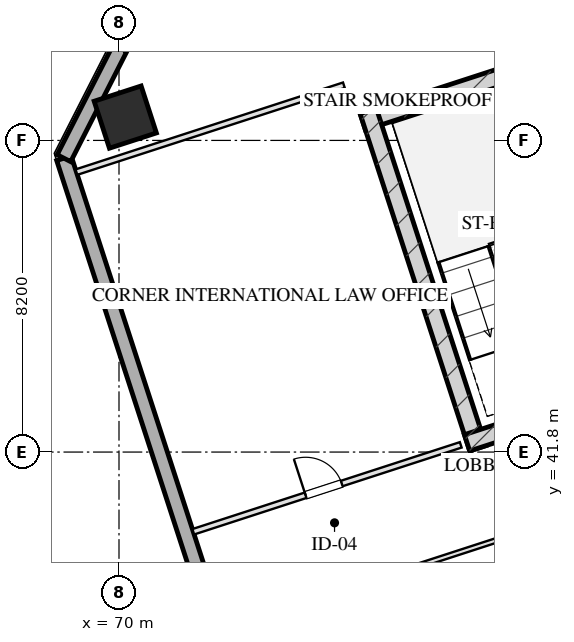
"""IFC4 building model, lengths in metres.
Left out: names, types, materials, properties, quantities, classifications, styles, units other than length and angle.
Written with IfcOpenShell. Run it as: python <this file> out.ifc"""

import sys

from ifc_helpers import new_model, si_unit, direction, frame, frame_2d, origin, origin_2d, place, context, subcontext, project, spatial, rectangle, hollow_rectangle, extrude, element, fill, save


model = new_model("IFC4")
c1 = context("Model", 3, precision=1e-05, world=origin(), true_north=direction((0.0, 1.0)))
c2 = subcontext(c1, "Body", "Model", "MODEL_VIEW")
j1 = project(units=[si_unit("LENGTHUNIT", "METRE"), si_unit("PLANEANGLEUNIT", "RADIAN")], contexts=[c1])
p1 = place(None, origin())
s1 = spatial("IfcSite", under=j1, at=p1, CompositionType="ELEMENT")
p2 = place(p1, origin())
s2 = spatial("IfcBuilding", under=s1, at=p2, CompositionType="ELEMENT")
p3 = place(p2, frame((0.0, 0.0, 192.05)))
s3 = spatial("IfcBuildingStorey", under=s2, at=p3, CompositionType="ELEMENT", Elevation=192.05)
p4 = place(p3, frame((76.415, 50.489, 0.0), z_axis=(0.0, 0.0, 1.0), x_axis=(0.951056810414, 0.309016089169, 0.0)))
e1 = element("IfcWall", 1, at=p4, inside=s3, PredefinedType="SHEAR", context=c2, shape_type="SweptSolid", body=[
    extrude(rectangle(XDim=16.25, YDim=0.45, at=frame_2d((8.125, 0.0))), origin(), (0.0, 0.0, 1.0), 3.45),
])
p5 = place(p3, frame((79.442, 41.899, 0.0), z_axis=(0.0, 0.0, 1.0), x_axis=(-0.309035778627, 0.951050412717, 0.0)))
e2 = element("IfcWall", 2, at=p5, inside=s3, PredefinedType="SHEAR", context=c2, shape_type="SweptSolid", body=[
    extrude(rectangle(XDim=9.33, YDim=0.45, at=frame_2d((4.665, 0.0))), origin(), (0.0, 0.0, 1.0), 3.45),
])
p6 = place(p3, frame((79.159, 42.043, 0.0), z_axis=(0.0, 0.0, 1.0), x_axis=(0.951047485828, 0.309044785913, 0.0)))
e3 = element("IfcWall", 3, at=p6, inside=s3, PredefinedType="SHEAR", context=c2, shape_type="SweptSolid", body=[
    extrude(rectangle(XDim=4.145, YDim=0.45, at=frame_2d((2.073, 0.0))), origin(), (0.0, 0.0, 1.0), 3.45),
])
p7 = place(p3, frame((70.165, 50.614, 0.0), z_axis=(0.0, 0.0, 1.0), x_axis=(0.951056516295, 0.309016994375, 0.0)))
e4 = element("IfcColumn", 4, at=p7, inside=s3, PredefinedType="COLUMN", context=c2, shape_type="SweptSolid", body=[
    extrude(hollow_rectangle(XDim=1.3, YDim=1.3, WallThickness=0.045, at=origin_2d()), origin(), (0.0, 0.0, 1.0), 3.451),
])
p8 = place(p3, frame((81.776, 8.827, 0.0), z_axis=(0.0, 0.0, 1.0), x_axis=(-0.309014228706, 0.951057414911, 0.0)))
e5 = element("IfcWall", 5, at=p8, inside=s3, PredefinedType="SOLIDWALL", context=c2, shape_type="SweptSolid", body=[
    extrude(rectangle(XDim=42.8, YDim=0.4, at=frame_2d((21.4, 0.0))), origin(), (0.0, 0.0, 1.0), 2.61),
])
p9 = place(p8, frame((13.95, 0.0, 0.75)))
e6 = element("IfcOpeningElement", 6, at=p9, cuts=e5, PredefinedType="OPENING", context=c2, shape_type="SweptSolid", body=[
    extrude(rectangle(XDim=2.1, YDim=1.46, at=frame_2d((1.05, 0.73))), frame((0.0, 0.21, 0.0), z_axis=(0.0, -1.0, 0.0), x_axis=(1.0, 0.0, 0.0)), (0.0, 0.0, 1.0), 0.42),
])
p10 = place(p8, frame((17.75, 0.0, 0.75)))
e7 = element("IfcOpeningElement", 7, at=p10, cuts=e5, PredefinedType="OPENING", context=c2, shape_type="SweptSolid", body=[
    extrude(rectangle(XDim=2.1, YDim=1.46, at=frame_2d((1.05, 0.73))), frame((0.0, 0.21, 0.0), z_axis=(0.0, -1.0, 0.0), x_axis=(1.0, 0.0, 0.0)), (0.0, 0.0, 1.0), 0.42),
])
p11 = place(p8, frame((22.95, 0.0, 0.75)))
e8 = element("IfcOpeningElement", 8, at=p11, cuts=e5, PredefinedType="OPENING", context=c2, shape_type="SweptSolid", body=[
    extrude(rectangle(XDim=2.1, YDim=1.46, at=frame_2d((1.05, 0.73))), frame((0.0, 0.21, 0.0), z_axis=(0.0, -1.0, 0.0), x_axis=(1.0, 0.0, 0.0)), (0.0, 0.0, 1.0), 0.42),
])
p12 = place(p8, frame((26.75, 0.0, 0.75)))
e9 = element("IfcOpeningElement", 9, at=p12, cuts=e5, PredefinedType="OPENING", context=c2, shape_type="SweptSolid", body=[
    extrude(rectangle(XDim=2.1, YDim=1.46, at=frame_2d((1.05, 0.73))), frame((0.0, 0.21, 0.0), z_axis=(0.0, -1.0, 0.0), x_axis=(1.0, 0.0, 0.0)), (0.0, 0.0, 1.0), 0.42),
])
p13 = place(p3, frame((68.551, 49.532, 0.0), z_axis=(0.0, 0.0, 1.0), x_axis=(0.454019523198, 0.890991735402, 0.0)))
e10 = element("IfcWall", 10, at=p13, inside=s3, PredefinedType="SOLIDWALL", context=c2, shape_type="SweptSolid", body=[
    extrude(rectangle(XDim=3.394, YDim=0.4, at=frame_2d((1.697, 0.0))), origin(), (0.0, 0.0, 1.0), 2.61),
])
p14 = place(p3, frame((68.88, 49.166, 0.0), z_axis=(0.0, 0.0, 1.0), x_axis=(0.951060977215, 0.309003264738, 0.0)))
e11 = element("IfcWall", 11, at=p14, inside=s3, PredefinedType="PARTITIONING", context=c2, shape_type="SweptSolid", body=[
    extrude(rectangle(XDim=7.4, YDim=0.15, at=frame_2d((3.7, 0.0))), origin(), (0.0, 0.0, 1.0), 3.175),
])
p15 = place(p3, frame((71.955, 39.703, 0.0), z_axis=(0.0, 0.0, 1.0), x_axis=(0.951060977215, 0.309003264738, 0.0)))
e12 = element("IfcWall", 12, at=p15, inside=s3, PredefinedType="PARTITIONING", context=c2, shape_type="SweptSolid", body=[
    extrude(rectangle(XDim=7.4, YDim=0.15, at=frame_2d((3.7, 0.0))), origin(), (0.0, 0.0, 1.0), 3.175),
])
p16 = place(p15, frame((3.108, 0.0, 0.0)))
e13 = element("IfcOpeningElement", 13, at=p16, cuts=e12, PredefinedType="OPENING", context=c2, shape_type="SweptSolid", body=[
    extrude(rectangle(XDim=1.0, YDim=2.05, at=frame_2d((0.5, 1.025))), frame((0.0, 0.085, 0.0), z_axis=(0.0, -1.0, 0.0), x_axis=(1.0, 0.0, 0.0)), (0.0, 0.0, 1.0), 0.17),
])
p17 = place(p3, frame((72.783, 37.154, 0.0), z_axis=(0.0, 0.0, 1.0), x_axis=(0.951053980838, 0.309024797601, 0.0)))
e14 = element("IfcWall", 14, at=p17, inside=s3, PredefinedType="PARTITIONING", context=c2, shape_type="SweptSolid", body=[
    extrude(rectangle(XDim=9.55, YDim=0.12, at=frame_2d((4.775, 0.0))), origin(), (0.0, 0.0, 1.0), 3.175),
])
p18 = place(p16, origin())
e15 = element("IfcDoor", 15, at=p18, inside=s3, OperationType="SINGLE_SWING_LEFT", PredefinedType="DOOR", context=c2, shape_type="SweptSolid", body=[
    extrude(rectangle(XDim=1.0, YDim=2.05, at=frame_2d((0.5, 1.025))), frame((0.0, 0.025, 0.0), z_axis=(0.0, -1.0, 0.0), x_axis=(1.0, 0.0, 0.0)), (0.0, 0.0, 1.0), 0.05),
])
fill(e13, e15)
save(model, sys.argv[1])
